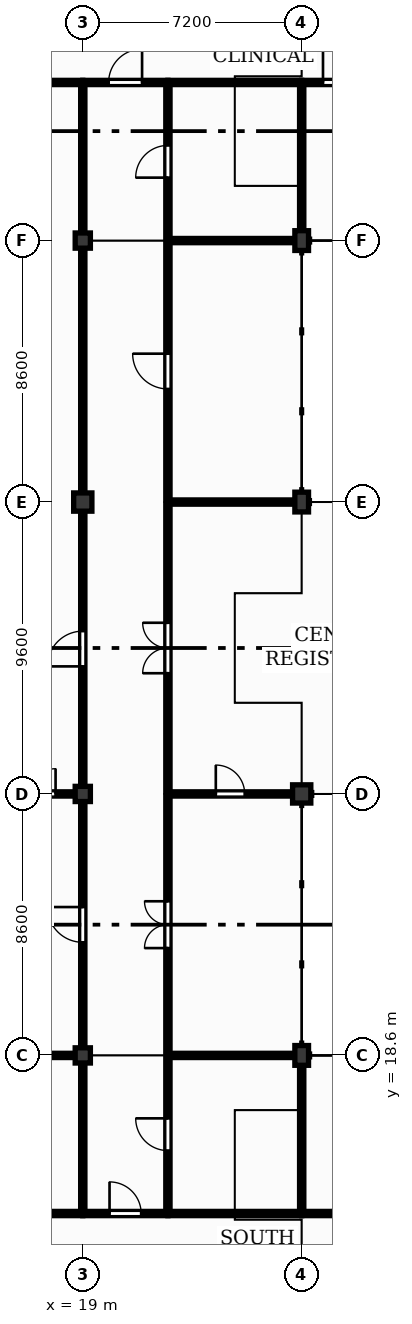
"""IFC4 building model, lengths in metres.
Left out: names, types, materials, properties, quantities, classifications, styles, units other than length and angle.
Written with IfcOpenShell. Run it as: python <this file> out.ifc"""

import sys

from ifc_helpers import new_model, si_unit, direction, frame, frame_2d, origin, origin_2d, place, context, subcontext, project, spatial, rectangle, extrude, element, fill, save


model = new_model("IFC4")
c1 = context("Model", 3, precision=1e-05, world=origin(), true_north=direction((0.0, 1.0)))
c2 = subcontext(c1, "Body", "Model", "MODEL_VIEW")
j1 = project(units=[si_unit("LENGTHUNIT", "METRE"), si_unit("PLANEANGLEUNIT", "RADIAN")], contexts=[c1])
p1 = place(None, origin())
s1 = spatial("IfcSite", under=j1, at=p1, CompositionType="ELEMENT")
p2 = place(p1, origin())
s2 = spatial("IfcBuilding", under=s1, at=p2, CompositionType="ELEMENT")
p3 = place(p2, origin())
s3 = spatial("IfcBuildingStorey", under=s2, at=p3, CompositionType="ELEMENT", Elevation=0.0)
for number, where, z_axis, x_axis in (
    (1, (19.0, 18.6, 0.0), (0.0, 0.0, 1.0), (1.0, 0.0, 0.0)),
    (2, (19.0, 27.2, 0.0), (0.0, 0.0, 1.0), (1.0, 0.0, 0.0)),
):
    element("IfcColumn", number, at=place(p3, frame(where, z_axis=z_axis, x_axis=x_axis)), inside=s3, PredefinedType="COLUMN", context=c2, shape_type="SweptSolid", body=[
        extrude(rectangle(XDim=0.5, YDim=0.5, at=origin_2d()), origin(), (0.0, 0.0, 1.0), 4.2),
    ])
p4 = place(p3, frame((19.0, 36.8, 0.0), z_axis=(0.0, 0.0, 1.0), x_axis=(1.0, 0.0, 0.0)))
e3 = element("IfcColumn", 3, at=p4, inside=s3, PredefinedType="COLUMN", context=c2, shape_type="SweptSolid", body=[
    extrude(rectangle(XDim=0.6, YDim=0.6, at=origin_2d()), origin(), (0.0, 0.0, 1.0), 4.2),
])
p5 = place(p3, frame((19.0, 45.4, 0.0), z_axis=(0.0, 0.0, 1.0), x_axis=(1.0, 0.0, 0.0)))
e4 = element("IfcColumn", 4, at=p5, inside=s3, PredefinedType="COLUMN", context=c2, shape_type="SweptSolid", body=[
    extrude(rectangle(XDim=0.5, YDim=0.5, at=origin_2d()), origin(), (0.0, 0.0, 1.0), 4.2),
])
p6 = place(p3, frame((26.2, 18.6, 0.0), z_axis=(0.0, 0.0, 1.0), x_axis=(1.0, 0.0, 0.0)))
e5 = element("IfcColumn", 5, at=p6, inside=s3, PredefinedType="COLUMN", context=c2, shape_type="SweptSolid", body=[
    extrude(rectangle(XDim=0.45, YDim=0.65, at=origin_2d()), origin(), (0.0, 0.0, 1.0), 4.2),
])
p7 = place(p3, frame((26.2, 27.2, 0.0), z_axis=(0.0, 0.0, 1.0), x_axis=(1.0, 0.0, 0.0)))
e6 = element("IfcColumn", 6, at=p7, inside=s3, PredefinedType="COLUMN", context=c2, shape_type="SweptSolid", body=[
    extrude(rectangle(XDim=0.6, YDim=0.6, at=origin_2d()), origin(), (0.0, 0.0, 1.0), 4.2),
])
for number, where, z_axis, x_axis in (
    (7, (26.2, 36.8, 0.0), (0.0, 0.0, 1.0), (1.0, 0.0, 0.0)),
    (8, (26.2, 45.4, 0.0), (0.0, 0.0, 1.0), (1.0, 0.0, 0.0)),
):
    element("IfcColumn", number, at=place(p3, frame(where, z_axis=z_axis, x_axis=x_axis)), inside=s3, PredefinedType="COLUMN", context=c2, shape_type="SweptSolid", body=[
        extrude(rectangle(XDim=0.45, YDim=0.65, at=origin_2d()), origin(), (0.0, 0.0, 1.0), 4.2),
    ])
p8 = place(p3, frame((15.522, 13.4, 0.0), z_axis=(0.0, 0.0, 1.0), x_axis=(1.0, 0.0, 0.0)))
e9 = element("IfcWall", 9, at=p8, inside=s3, PredefinedType="PARTITIONING", context=c2, shape_type="SweptSolid", body=[
    extrude(rectangle(XDim=3.478, YDim=0.14, at=frame_2d((1.739, 0.0))), origin(), (0.0, 0.0, 1.0), 4.18),
])
p9 = place(p8, frame((1.249, 0.0, 0.0)))
e10 = element("IfcOpeningElement", 10, at=p9, cuts=e9, PredefinedType="OPENING", context=c2, shape_type="SweptSolid", body=[
    extrude(rectangle(XDim=0.98, YDim=2.15, at=frame_2d((0.49, 1.075))), frame((0.0, 0.08, 0.0), z_axis=(0.0, -1.0, 0.0), x_axis=(1.0, 0.0, 0.0)), (0.0, 0.0, 1.0), 0.16),
])
p10 = place(p3, frame((15.522, 18.6, 0.0), z_axis=(0.0, 0.0, 1.0), x_axis=(1.0, 0.0, 0.0)))
e11 = element("IfcWall", 11, at=p10, inside=s3, PredefinedType="PARTITIONING", context=c2, shape_type="SweptSolid", body=[
    extrude(rectangle(XDim=3.228, YDim=0.14, at=frame_2d((1.614, 0.0))), origin(), (0.0, 0.0, 1.0), 3.25),
])
p11 = place(p3, frame((15.8, 27.2, 0.0), z_axis=(0.0, 0.0, 1.0), x_axis=(1.0, 0.0, 0.0)))
e12 = element("IfcWall", 12, at=p11, inside=s3, PredefinedType="PARTITIONING", context=c2, shape_type="SweptSolid", body=[
    extrude(rectangle(XDim=2.95, YDim=0.14, at=frame_2d((1.475, 0.0))), origin(), (0.0, 0.0, 1.0), 3.68),
])
p12 = place(p11, frame((0.645, 0.0, 0.0)))
e13 = element("IfcOpeningElement", 13, at=p12, cuts=e12, PredefinedType="OPENING", context=c2, shape_type="SweptSolid", body=[
    extrude(rectangle(XDim=1.66, YDim=2.3, at=frame_2d((0.83, 1.15))), frame((0.0, 0.08, 0.0), z_axis=(0.0, -1.0, 0.0), x_axis=(1.0, 0.0, 0.0)), (0.0, 0.0, 1.0), 0.16),
])
p13 = place(p3, frame((15.8, 50.6, 0.0), z_axis=(0.0, 0.0, 1.0), x_axis=(1.0, 0.0, 0.0)))
e14 = element("IfcWall", 14, at=p13, inside=s3, PredefinedType="PARTITIONING", context=c2, shape_type="SweptSolid", body=[
    extrude(rectangle(XDim=3.2, YDim=0.14, at=frame_2d((1.6, 0.0))), origin(), (0.0, 0.0, 1.0), 4.18),
])
p14 = place(p13, frame((1.14, 0.0, 0.0)))
e15 = element("IfcOpeningElement", 15, at=p14, cuts=e14, PredefinedType="OPENING", context=c2, shape_type="SweptSolid", body=[
    extrude(rectangle(XDim=0.92, YDim=2.1, at=frame_2d((0.46, 1.05))), frame((0.0, 0.08, 0.0), z_axis=(0.0, -1.0, 0.0), x_axis=(1.0, 0.0, 0.0)), (0.0, 0.0, 1.0), 0.16),
])
p15 = place(p3, frame((19.0, 13.47, 0.0), z_axis=(0.0, 0.0, 1.0), x_axis=(0.0, 1.0, 0.0)))
e16 = element("IfcWall", 16, at=p15, inside=s3, PredefinedType="PARTITIONING", context=c2, shape_type="SweptSolid", body=[
    extrude(rectangle(XDim=4.88, YDim=0.14, at=frame_2d((2.44, 0.0))), origin(), (0.0, 0.0, 1.0), 3.5),
])
p16 = place(p3, frame((19.0, 13.4, 0.0), z_axis=(0.0, 0.0, 1.0), x_axis=(1.0, 0.0, 0.0)))
e17 = element("IfcWall", 17, at=p16, inside=s3, PredefinedType="PARTITIONING", context=c2, shape_type="SweptSolid", body=[
    extrude(rectangle(XDim=2.8, YDim=0.14, at=frame_2d((1.4, 0.0))), origin(), (0.0, 0.0, 1.0), 4.18),
])
p17 = place(p16, frame((0.88, 0.0, 0.0)))
e18 = element("IfcOpeningElement", 18, at=p17, cuts=e17, PredefinedType="OPENING", context=c2, shape_type="SweptSolid", body=[
    extrude(rectangle(XDim=1.04, YDim=2.1, at=frame_2d((0.52, 1.05))), frame((0.0, 0.08, 0.0), z_axis=(0.0, -1.0, 0.0), x_axis=(1.0, 0.0, 0.0)), (0.0, 0.0, 1.0), 0.16),
])
p18 = place(p3, frame((19.0, 18.85, 0.0), z_axis=(0.0, 0.0, 1.0), x_axis=(0.0, 1.0, 0.0)))
e19 = element("IfcWall", 19, at=p18, inside=s3, PredefinedType="PARTITIONING", context=c2, shape_type="SweptSolid", body=[
    extrude(rectangle(XDim=8.1, YDim=0.14, at=frame_2d((4.05, 0.0))), origin(), (0.0, 0.0, 1.0), 3.68),
])
p19 = place(p18, frame((3.47, 0.0, 0.0)))
e20 = element("IfcOpeningElement", 20, at=p19, cuts=e19, PredefinedType="OPENING", context=c2, shape_type="SweptSolid", body=[
    extrude(rectangle(XDim=1.16, YDim=2.1, at=frame_2d((0.58, 1.05))), frame((0.0, 0.08, 0.0), z_axis=(0.0, -1.0, 0.0), x_axis=(1.0, 0.0, 0.0)), (0.0, 0.0, 1.0), 0.16),
])
p20 = place(p3, frame((19.0, 27.45, 0.0), z_axis=(0.0, 0.0, 1.0), x_axis=(0.0, 1.0, 0.0)))
e21 = element("IfcWall", 21, at=p20, inside=s3, PredefinedType="PARTITIONING", context=c2, shape_type="SweptSolid", body=[
    extrude(rectangle(XDim=9.05, YDim=0.14, at=frame_2d((4.525, 0.0))), origin(), (0.0, 0.0, 1.0), 3.4),
])
p21 = place(p20, frame((3.945, 0.0, 0.0)))
e22 = element("IfcOpeningElement", 22, at=p21, cuts=e21, PredefinedType="OPENING", context=c2, shape_type="SweptSolid", body=[
    extrude(rectangle(XDim=1.16, YDim=2.1, at=frame_2d((0.58, 1.05))), frame((0.0, 0.08, 0.0), z_axis=(0.0, -1.0, 0.0), x_axis=(1.0, 0.0, 0.0)), (0.0, 0.0, 1.0), 0.16),
])
p22 = place(p3, frame((19.0, 37.1, 0.0), z_axis=(0.0, 0.0, 1.0), x_axis=(0.0, 1.0, 0.0)))
e23 = element("IfcWall", 23, at=p22, inside=s3, PredefinedType="PARTITIONING", context=c2, shape_type="SweptSolid", body=[
    extrude(rectangle(XDim=8.05, YDim=0.14, at=frame_2d((4.025, 0.0))), origin(), (0.0, 0.0, 1.0), 3.4),
])
p23 = place(p3, frame((19.0, 45.65, 0.0), z_axis=(0.0, 0.0, 1.0), x_axis=(0.0, 1.0, 0.0)))
e24 = element("IfcWall", 24, at=p23, inside=s3, PredefinedType="PARTITIONING", context=c2, shape_type="SweptSolid", body=[
    extrude(rectangle(XDim=4.88, YDim=0.14, at=frame_2d((2.44, 0.0))), origin(), (0.0, 0.0, 1.0), 3.5),
])
p24 = place(p3, frame((19.0, 50.6, 0.0), z_axis=(0.0, 0.0, 1.0), x_axis=(1.0, 0.0, 0.0)))
e25 = element("IfcWall", 25, at=p24, inside=s3, PredefinedType="PARTITIONING", context=c2, shape_type="SweptSolid", body=[
    extrude(rectangle(XDim=2.8, YDim=0.14, at=frame_2d((1.4, 0.0))), origin(), (0.0, 0.0, 1.0), 4.18),
])
p25 = place(p24, frame((0.85, 0.0, 0.0)))
e26 = element("IfcOpeningElement", 26, at=p25, cuts=e25, PredefinedType="OPENING", context=c2, shape_type="SweptSolid", body=[
    extrude(rectangle(XDim=1.1, YDim=2.1, at=frame_2d((0.55, 1.05))), frame((0.0, 0.08, 0.0), z_axis=(0.0, -1.0, 0.0), x_axis=(1.0, 0.0, 0.0)), (0.0, 0.0, 1.0), 0.16),
])
p26 = place(p3, frame((21.8, 13.47, 0.0), z_axis=(0.0, 0.0, 1.0), x_axis=(0.0, 1.0, 0.0)))
e27 = element("IfcWall", 27, at=p26, inside=s3, PredefinedType="PARTITIONING", context=c2, shape_type="SweptSolid", body=[
    extrude(rectangle(XDim=5.06, YDim=0.14, at=frame_2d((2.53, 0.0))), origin(), (0.0, 0.0, 1.0), 4.18),
])
p27 = place(p26, frame((2.0, 0.0, 0.0)))
e28 = element("IfcOpeningElement", 28, at=p27, cuts=e27, PredefinedType="OPENING", context=c2, shape_type="SweptSolid", body=[
    extrude(rectangle(XDim=1.06, YDim=2.15, at=frame_2d((0.53, 1.075))), frame((0.0, 0.08, 0.0), z_axis=(0.0, -1.0, 0.0), x_axis=(1.0, 0.0, 0.0)), (0.0, 0.0, 1.0), 0.16),
])
p28 = place(p3, frame((21.8, 13.4, 0.0), z_axis=(0.0, 0.0, 1.0), x_axis=(1.0, 0.0, 0.0)))
e29 = element("IfcWall", 29, at=p28, inside=s3, PredefinedType="PARTITIONING", context=c2, shape_type="SweptSolid", body=[
    extrude(rectangle(XDim=4.4, YDim=0.14, at=frame_2d((2.2, 0.0))), origin(), (0.0, 0.0, 1.0), 4.18),
])
p29 = place(p3, frame((21.8, 18.67, 0.0), z_axis=(0.0, 0.0, 1.0), x_axis=(0.0, 1.0, 0.0)))
e30 = element("IfcWall", 30, at=p29, inside=s3, PredefinedType="PARTITIONING", context=c2, shape_type="SweptSolid", body=[
    extrude(rectangle(XDim=8.46, YDim=0.14, at=frame_2d((4.23, 0.0))), origin(), (0.0, 0.0, 1.0), 4.18),
])
p30 = place(p29, frame((3.46, 0.0, 0.0)))
e31 = element("IfcOpeningElement", 31, at=p30, cuts=e30, PredefinedType="OPENING", context=c2, shape_type="SweptSolid", body=[
    extrude(rectangle(XDim=1.54, YDim=2.25, at=frame_2d((0.77, 1.125))), frame((0.0, 0.08, 0.0), z_axis=(0.0, -1.0, 0.0), x_axis=(1.0, 0.0, 0.0)), (0.0, 0.0, 1.0), 0.16),
])
p31 = place(p3, frame((21.8, 18.6, 0.0), z_axis=(0.0, 0.0, 1.0), x_axis=(1.0, 0.0, 0.0)))
e32 = element("IfcWall", 32, at=p31, inside=s3, PredefinedType="PARTITIONING", context=c2, shape_type="SweptSolid", body=[
    extrude(rectangle(XDim=4.175, YDim=0.14, at=frame_2d((2.087, 0.0))), origin(), (0.0, 0.0, 1.0), 3.25),
])
p32 = place(p3, frame((21.8, 27.27, 0.0), z_axis=(0.0, 0.0, 1.0), x_axis=(0.0, 1.0, 0.0)))
e33 = element("IfcWall", 33, at=p32, inside=s3, PredefinedType="PARTITIONING", context=c2, shape_type="SweptSolid", body=[
    extrude(rectangle(XDim=9.46, YDim=0.14, at=frame_2d((4.73, 0.0))), origin(), (0.0, 0.0, 1.0), 4.18),
])
p33 = place(p32, frame((3.9, 0.0, 0.0)))
e34 = element("IfcOpeningElement", 34, at=p33, cuts=e33, PredefinedType="OPENING", context=c2, shape_type="SweptSolid", body=[
    extrude(rectangle(XDim=1.66, YDim=2.3, at=frame_2d((0.83, 1.15))), frame((0.0, 0.08, 0.0), z_axis=(0.0, -1.0, 0.0), x_axis=(1.0, 0.0, 0.0)), (0.0, 0.0, 1.0), 0.16),
])
p34 = place(p3, frame((21.8, 27.2, 0.0), z_axis=(0.0, 0.0, 1.0), x_axis=(1.0, 0.0, 0.0)))
e35 = element("IfcWall", 35, at=p34, inside=s3, PredefinedType="PARTITIONING", context=c2, shape_type="SweptSolid", body=[
    extrude(rectangle(XDim=4.1, YDim=0.14, at=frame_2d((2.05, 0.0))), origin(), (0.0, 0.0, 1.0), 3.6),
])
p35 = place(p34, frame((1.575, 0.0, 0.0)))
e36 = element("IfcOpeningElement", 36, at=p35, cuts=e35, PredefinedType="OPENING", context=c2, shape_type="SweptSolid", body=[
    extrude(rectangle(XDim=0.95, YDim=2.1, at=frame_2d((0.475, 1.05))), frame((0.0, 0.08, 0.0), z_axis=(0.0, -1.0, 0.0), x_axis=(1.0, 0.0, 0.0)), (0.0, 0.0, 1.0), 0.16),
])
p36 = place(p3, frame((21.8, 36.87, 0.0), z_axis=(0.0, 0.0, 1.0), x_axis=(0.0, 1.0, 0.0)))
e37 = element("IfcWall", 37, at=p36, inside=s3, PredefinedType="PARTITIONING", context=c2, shape_type="SweptSolid", body=[
    extrude(rectangle(XDim=8.46, YDim=0.14, at=frame_2d((4.23, 0.0))), origin(), (0.0, 0.0, 1.0), 4.18),
])
p37 = place(p36, frame((3.65, 0.0, 0.0)))
e38 = element("IfcOpeningElement", 38, at=p37, cuts=e37, PredefinedType="OPENING", context=c2, shape_type="SweptSolid", body=[
    extrude(rectangle(XDim=1.16, YDim=2.1, at=frame_2d((0.58, 1.05))), frame((0.0, 0.08, 0.0), z_axis=(0.0, -1.0, 0.0), x_axis=(1.0, 0.0, 0.0)), (0.0, 0.0, 1.0), 0.16),
])
p38 = place(p3, frame((21.8, 36.8, 0.0), z_axis=(0.0, 0.0, 1.0), x_axis=(1.0, 0.0, 0.0)))
e39 = element("IfcWall", 39, at=p38, inside=s3, PredefinedType="PARTITIONING", context=c2, shape_type="SweptSolid", body=[
    extrude(rectangle(XDim=4.175, YDim=0.14, at=frame_2d((2.087, 0.0))), origin(), (0.0, 0.0, 1.0), 3.5),
])
p39 = place(p3, frame((21.8, 45.47, 0.0), z_axis=(0.0, 0.0, 1.0), x_axis=(0.0, 1.0, 0.0)))
e40 = element("IfcWall", 40, at=p39, inside=s3, PredefinedType="PARTITIONING", context=c2, shape_type="SweptSolid", body=[
    extrude(rectangle(XDim=5.06, YDim=0.14, at=frame_2d((2.53, 0.0))), origin(), (0.0, 0.0, 1.0), 4.18),
])
p40 = place(p39, frame((2.0, 0.0, 0.0)))
e41 = element("IfcOpeningElement", 41, at=p40, cuts=e40, PredefinedType="OPENING", context=c2, shape_type="SweptSolid", body=[
    extrude(rectangle(XDim=1.06, YDim=2.15, at=frame_2d((0.53, 1.075))), frame((0.0, 0.08, 0.0), z_axis=(0.0, -1.0, 0.0), x_axis=(1.0, 0.0, 0.0)), (0.0, 0.0, 1.0), 0.16),
])
p41 = place(p3, frame((21.8, 45.4, 0.0), z_axis=(0.0, 0.0, 1.0), x_axis=(1.0, 0.0, 0.0)))
e42 = element("IfcWall", 42, at=p41, inside=s3, PredefinedType="PARTITIONING", context=c2, shape_type="SweptSolid", body=[
    extrude(rectangle(XDim=4.175, YDim=0.14, at=frame_2d((2.087, 0.0))), origin(), (0.0, 0.0, 1.0), 3.25),
])
p42 = place(p3, frame((21.8, 50.6, 0.0), z_axis=(0.0, 0.0, 1.0), x_axis=(1.0, 0.0, 0.0)))
e43 = element("IfcWall", 43, at=p42, inside=s3, PredefinedType="PARTITIONING", context=c2, shape_type="SweptSolid", body=[
    extrude(rectangle(XDim=4.4, YDim=0.14, at=frame_2d((2.2, 0.0))), origin(), (0.0, 0.0, 1.0), 4.18),
])
p43 = place(p3, frame((26.2, 13.47, 0.0), z_axis=(0.0, 0.0, 1.0), x_axis=(0.0, 1.0, 0.0)))
e44 = element("IfcWall", 44, at=p43, inside=s3, PredefinedType="PARTITIONING", context=c2, shape_type="SweptSolid", body=[
    extrude(rectangle(XDim=4.805, YDim=0.14, at=frame_2d((2.402, 0.0))), origin(), (0.0, 0.0, 1.0), 3.5),
])
p44 = place(p3, frame((26.2, 13.4, 0.0), z_axis=(0.0, 0.0, 1.0), x_axis=(1.0, 0.0, 0.0)))
e45 = element("IfcWall", 45, at=p44, inside=s3, PredefinedType="PARTITIONING", context=c2, shape_type="SweptSolid", body=[
    extrude(rectangle(XDim=3.233, YDim=0.14, at=frame_2d((1.617, 0.0))), origin(), (0.0, 0.0, 1.0), 4.18),
])
p45 = place(p44, frame((1.007, 0.0, 0.0)))
e46 = element("IfcOpeningElement", 46, at=p45, cuts=e45, PredefinedType="OPENING", context=c2, shape_type="SweptSolid", body=[
    extrude(rectangle(XDim=1.22, YDim=2.1, at=frame_2d((0.61, 1.05))), frame((0.0, 0.08, 0.0), z_axis=(0.0, -1.0, 0.0), x_axis=(1.0, 0.0, 0.0)), (0.0, 0.0, 1.0), 0.16),
])
p46 = place(p3, frame((26.2, 45.725, 0.0), z_axis=(0.0, 0.0, 1.0), x_axis=(0.0, 1.0, 0.0)))
e47 = element("IfcWall", 47, at=p46, inside=s3, PredefinedType="PARTITIONING", context=c2, shape_type="SweptSolid", body=[
    extrude(rectangle(XDim=4.805, YDim=0.14, at=frame_2d((2.402, 0.0))), origin(), (0.0, 0.0, 1.0), 3.5),
])
p47 = place(p3, frame((26.2, 50.6, 0.0), z_axis=(0.0, 0.0, 1.0), x_axis=(1.0, 0.0, 0.0)))
e48 = element("IfcWall", 48, at=p47, inside=s3, PredefinedType="PARTITIONING", context=c2, shape_type="SweptSolid", body=[
    extrude(rectangle(XDim=2.621, YDim=0.14, at=frame_2d((1.311, 0.0))), origin(), (0.0, 0.0, 1.0), 4.18),
])
p48 = place(p47, frame((0.7, 0.0, 0.0)))
e49 = element("IfcOpeningElement", 49, at=p48, cuts=e48, PredefinedType="OPENING", context=c2, shape_type="SweptSolid", body=[
    extrude(rectangle(XDim=1.22, YDim=2.1, at=frame_2d((0.61, 1.05))), frame((0.0, 0.08, 0.0), z_axis=(0.0, -1.0, 0.0), x_axis=(1.0, 0.0, 0.0)), (0.0, 0.0, 1.0), 0.16),
])
p49 = place(p25, origin())
e50 = element("IfcDoor", 50, at=p49, inside=s3, OperationType="SINGLE_SWING_RIGHT", PredefinedType="DOOR", context=c2, shape_type="SweptSolid", body=[
    extrude(rectangle(XDim=1.1, YDim=2.1, at=frame_2d((0.55, 1.05))), frame((0.0, 0.025, 0.0), z_axis=(0.0, -1.0, 0.0), x_axis=(1.0, 0.0, 0.0)), (0.0, 0.0, 1.0), 0.05),
])
fill(e26, e50)
p50 = place(p21, origin())
e51 = element("IfcDoor", 51, at=p50, inside=s3, OperationType="SINGLE_SWING_LEFT", PredefinedType="DOOR", context=c2, shape_type="SweptSolid", body=[
    extrude(rectangle(XDim=1.16, YDim=2.1, at=frame_2d((0.58, 1.05))), frame((0.0, 0.025, 0.0), z_axis=(0.0, -1.0, 0.0), x_axis=(1.0, 0.0, 0.0)), (0.0, 0.0, 1.0), 0.05),
])
fill(e22, e51)
p51 = place(p12, origin())
e52 = element("IfcDoor", 52, at=p51, inside=s3, OperationType="DOUBLE_DOOR_SINGLE_SWING", PredefinedType="DOOR", context=c2, shape_type="SweptSolid", body=[
    extrude(rectangle(XDim=1.66, YDim=2.3, at=frame_2d((0.83, 1.15))), frame((0.0, 0.025, 0.0), z_axis=(0.0, -1.0, 0.0), x_axis=(1.0, 0.0, 0.0)), (0.0, 0.0, 1.0), 0.05),
])
fill(e13, e52)
p52 = place(p17, origin())
e53 = element("IfcDoor", 53, at=p52, inside=s3, OperationType="SINGLE_SWING_LEFT", PredefinedType="DOOR", context=c2, shape_type="SweptSolid", body=[
    extrude(rectangle(XDim=1.04, YDim=2.1, at=frame_2d((0.52, 1.05))), frame((0.0, 0.025, 0.0), z_axis=(0.0, -1.0, 0.0), x_axis=(1.0, 0.0, 0.0)), (0.0, 0.0, 1.0), 0.05),
])
fill(e18, e53)
p53 = place(p19, origin())
e54 = element("IfcDoor", 54, at=p53, inside=s3, OperationType="SINGLE_SWING_RIGHT", PredefinedType="DOOR", context=c2, shape_type="SweptSolid", body=[
    extrude(rectangle(XDim=1.16, YDim=2.1, at=frame_2d((0.58, 1.05))), frame((0.0, 0.025, 0.0), z_axis=(0.0, -1.0, 0.0), x_axis=(1.0, 0.0, 0.0)), (0.0, 0.0, 1.0), 0.05),
])
fill(e20, e54)
p54 = place(p33, origin())
e55 = element("IfcDoor", 55, at=p54, inside=s3, OperationType="DOUBLE_DOOR_SINGLE_SWING", PredefinedType="DOOR", context=c2, shape_type="SweptSolid", body=[
    extrude(rectangle(XDim=1.66, YDim=2.3, at=frame_2d((0.83, 1.15))), frame((0.0, 0.025, 0.0), z_axis=(0.0, -1.0, 0.0), x_axis=(1.0, 0.0, 0.0)), (0.0, 0.0, 1.0), 0.05),
])
fill(e34, e55)
p55 = place(p30, origin())
e56 = element("IfcDoor", 56, at=p55, inside=s3, OperationType="DOUBLE_DOOR_SINGLE_SWING", PredefinedType="DOOR", context=c2, shape_type="SweptSolid", body=[
    extrude(rectangle(XDim=1.54, YDim=2.25, at=frame_2d((0.77, 1.125))), frame((0.0, 0.025, 0.0), z_axis=(0.0, -1.0, 0.0), x_axis=(1.0, 0.0, 0.0)), (0.0, 0.0, 1.0), 0.05),
])
fill(e31, e56)
p56 = place(p35, origin())
e57 = element("IfcDoor", 57, at=p56, inside=s3, OperationType="SINGLE_SWING_LEFT", PredefinedType="DOOR", context=c2, shape_type="SweptSolid", body=[
    extrude(rectangle(XDim=0.95, YDim=2.1, at=frame_2d((0.475, 1.05))), frame((0.0, 0.025, 0.0), z_axis=(0.0, -1.0, 0.0), x_axis=(1.0, 0.0, 0.0)), (0.0, 0.0, 1.0), 0.05),
])
fill(e36, e57)
p57 = place(p37, origin())
e58 = element("IfcDoor", 58, at=p57, inside=s3, OperationType="SINGLE_SWING_RIGHT", PredefinedType="DOOR", context=c2, shape_type="SweptSolid", body=[
    extrude(rectangle(XDim=1.16, YDim=2.1, at=frame_2d((0.58, 1.05))), frame((0.0, 0.025, 0.0), z_axis=(0.0, -1.0, 0.0), x_axis=(1.0, 0.0, 0.0)), (0.0, 0.0, 1.0), 0.05),
])
fill(e38, e58)
p58 = place(p40, origin())
e59 = element("IfcDoor", 59, at=p58, inside=s3, OperationType="SINGLE_SWING_LEFT", PredefinedType="DOOR", context=c2, shape_type="SweptSolid", body=[
    extrude(rectangle(XDim=1.06, YDim=2.15, at=frame_2d((0.53, 1.075))), frame((0.0, 0.025, 0.0), z_axis=(0.0, -1.0, 0.0), x_axis=(1.0, 0.0, 0.0)), (0.0, 0.0, 1.0), 0.05),
])
fill(e41, e59)
p59 = place(p48, origin())
e60 = element("IfcDoor", 60, at=p59, inside=s3, OperationType="SINGLE_SWING_LEFT", PredefinedType="DOOR", context=c2, shape_type="SweptSolid", body=[
    extrude(rectangle(XDim=1.22, YDim=2.1, at=frame_2d((0.61, 1.05))), frame((0.0, 0.025, 0.0), z_axis=(0.0, -1.0, 0.0), x_axis=(1.0, 0.0, 0.0)), (0.0, 0.0, 1.0), 0.05),
])
fill(e49, e60)
p60 = place(p27, origin())
e61 = element("IfcDoor", 61, at=p60, inside=s3, OperationType="SINGLE_SWING_RIGHT", PredefinedType="DOOR", context=c2, shape_type="SweptSolid", body=[
    extrude(rectangle(XDim=1.06, YDim=2.15, at=frame_2d((0.53, 1.075))), frame((0.0, 0.025, 0.0), z_axis=(0.0, -1.0, 0.0), x_axis=(1.0, 0.0, 0.0)), (0.0, 0.0, 1.0), 0.05),
])
fill(e28, e61)
save(model, sys.argv[1])
